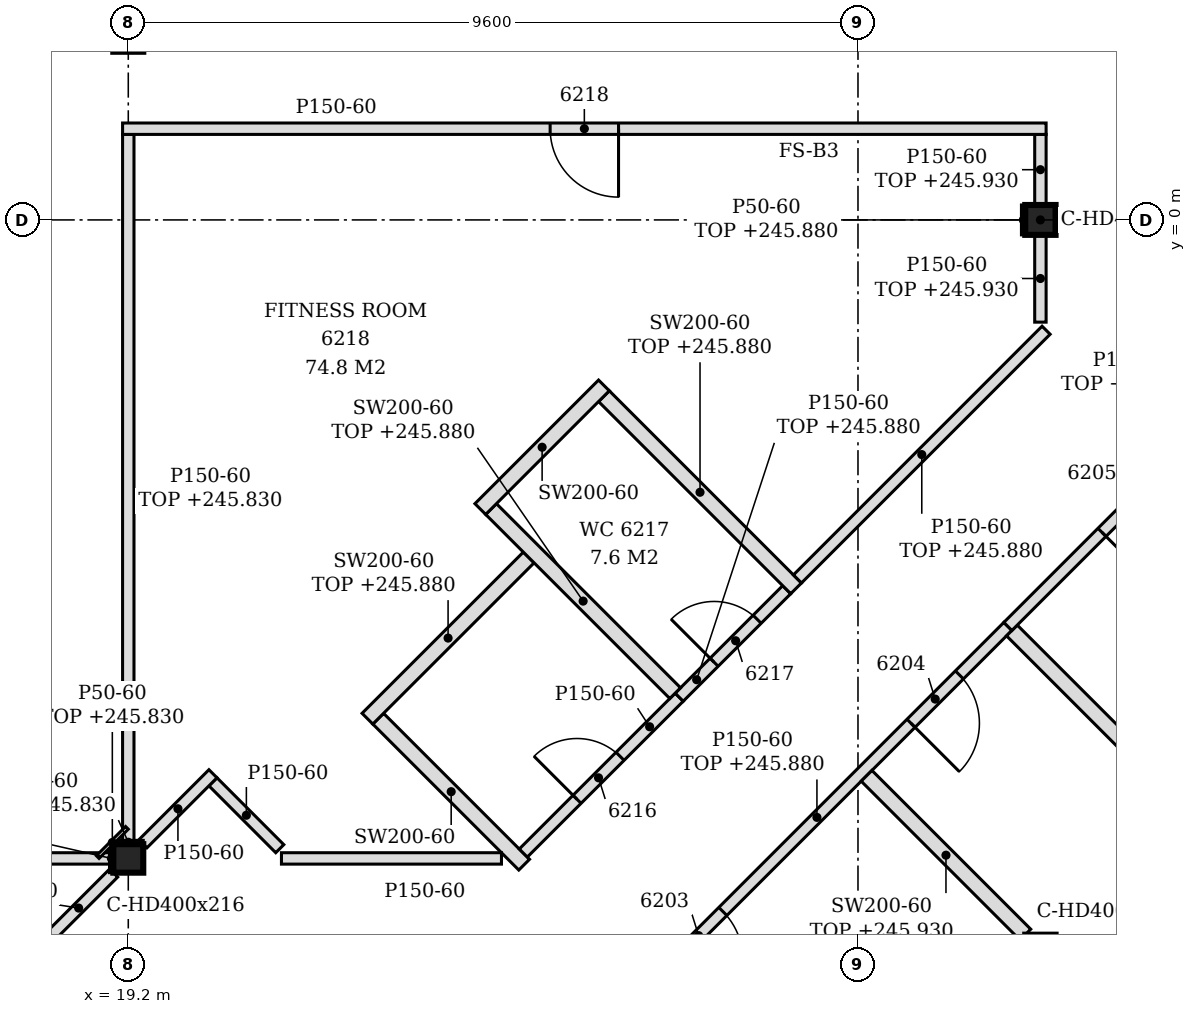
"""IFC4 building model, lengths in metres.
Left out: names, types, materials, properties, quantities, classifications, styles, units other than length and angle.
Written with IfcOpenShell. Run it as: python <this file> out.ifc"""

import sys

from ifc_helpers import new_model, si_unit, direction, frame, frame_2d, origin, origin_2d, place, context, subcontext, project, spatial, polyline, rectangle, i_section, outline, extrude, element, fill, save


model = new_model("IFC4")
c1 = context("Model", 3, precision=1e-05, world=origin(), true_north=direction((0.0, 1.0)))
c2 = subcontext(c1, "Body", "Model", "MODEL_VIEW")
j1 = project(units=[si_unit("LENGTHUNIT", "METRE"), si_unit("PLANEANGLEUNIT", "RADIAN")], contexts=[c1])
p1 = place(None, origin())
s1 = spatial("IfcSite", under=j1, at=p1, CompositionType="ELEMENT")
p2 = place(p1, origin())
s2 = spatial("IfcBuilding", under=s1, at=p2, CompositionType="ELEMENT")
p3 = place(p2, frame((0.0, 0.0, 243.0)))
s3 = spatial("IfcBuildingStorey", under=s2, at=p3, CompositionType="ELEMENT", Elevation=243.0)
p4 = place(p3, frame((19.2, -8.4, -0.15), z_axis=(0.0, 0.0, 1.0), x_axis=(1.0, 0.0, 0.0)))
e1 = element("IfcColumn", 1, at=p4, inside=s3, PredefinedType="COLUMN", context=c2, shape_type="SweptSolid", body=[
    extrude(i_section(OverallWidth=0.394, OverallDepth=0.375, WebThickness=0.017, FlangeThickness=0.028, FilletRadius=0.015, at=origin_2d()), origin(), (0.0, 0.0, 1.0), 3.6),
])
p5 = place(p3, frame((31.2, 0.0, -0.15), z_axis=(0.0, 0.0, 1.0), x_axis=(1.0, 0.0, 0.0)))
e2 = element("IfcColumn", 2, at=p5, inside=s3, PredefinedType="COLUMN", context=c2, shape_type="SweptSolid", body=[
    extrude(i_section(OverallWidth=0.399, OverallDepth=0.393, WebThickness=0.023, FlangeThickness=0.037, FilletRadius=0.015, at=origin_2d()), origin(), (0.0, 0.0, 1.0), 3.6),
])
p6 = place(p3, frame((24.619, -11.501, 0.0), z_axis=(0.0, 0.0, 1.0), x_axis=(0.707106781187, 0.707106781187, 0.0)))
e3 = element("IfcWall", 3, at=p6, inside=s3, PredefinedType="PARTITIONING", context=c2, shape_type="SweptSolid", body=[
    extrude(rectangle(XDim=8.702, YDim=0.15, at=frame_2d((4.351, 0.0))), origin(), (0.0, 0.0, 1.0), 2.88),
])
p7 = place(p6, frame((2.499, 0.0, 0.0)))
e4 = element("IfcOpeningElement", 4, at=p7, cuts=e3, PredefinedType="OPENING", context=c2, shape_type="SweptSolid", body=[
    extrude(rectangle(XDim=0.9, YDim=2.1, at=frame_2d((0.45, 1.05))), frame((0.0, 0.085, 0.0), z_axis=(0.0, -1.0, 0.0), x_axis=(1.0, 0.0, 0.0)), (0.0, 0.0, 1.0), 0.17),
])
p8 = place(p6, frame((6.9, 0.0, 0.0)))
e5 = element("IfcOpeningElement", 5, at=p8, cuts=e3, PredefinedType="OPENING", context=c2, shape_type="SweptSolid", body=[
    extrude(rectangle(XDim=0.9, YDim=2.1, at=frame_2d((0.45, 1.05))), frame((0.0, 0.085, 0.0), z_axis=(0.0, -1.0, 0.0), x_axis=(1.0, 0.0, 0.0)), (0.0, 0.0, 1.0), 0.17),
])
p9 = place(p3, frame((35.873, -10.449, 0.0), z_axis=(0.0, 0.0, 1.0), x_axis=(-0.707089680867, 0.707123881093, 0.0)))
e6 = element("IfcWall", 6, at=p9, inside=s3, PredefinedType="PARTITIONING", context=c2, shape_type="SweptSolid", body=[
    extrude(rectangle(XDim=7.139, YDim=0.2, at=frame_2d((3.569, 0.0))), origin(), (0.0, 0.0, 1.0), 2.93),
])
p10 = place(p3, frame((18.086, -9.514, 0.0), z_axis=(0.0, 0.0, 1.0), x_axis=(0.707200419109, 0.707013130862, 0.0)))
e7 = element("IfcWall", 7, at=p10, inside=s3, PredefinedType="PARTITIONING", context=c2, shape_type="SweptSolid", body=[
    extrude(rectangle(XDim=1.303, YDim=0.15, at=frame_2d((0.652, 0.0))), origin(), (0.0, 0.0, 1.0), 3.45),
])
p11 = place(p3, frame((31.002, -9.402, 0.0), z_axis=(0.0, 0.0, 1.0), x_axis=(-0.707065460118, 0.70714809984, 0.0)))
e8 = element("IfcWall", 8, at=p11, inside=s3, PredefinedType="PARTITIONING", context=c2, shape_type="SweptSolid", body=[
    extrude(rectangle(XDim=2.954, YDim=0.2, at=frame_2d((1.477, 0.0))), origin(), (0.0, 0.0, 1.0), 2.93),
])
p12 = place(p3, frame((24.408, -8.482, 0.0), z_axis=(0.0, 0.0, 1.0), x_axis=(-0.707061835578, 0.707151723938, 0.0)))
e9 = element("IfcWall", 9, at=p12, inside=s3, PredefinedType="PARTITIONING", context=c2, shape_type="SweptSolid", body=[
    extrude(rectangle(XDim=2.716, YDim=0.2, at=frame_2d((1.358, 0.0))), origin(), (0.0, 0.0, 1.0), 3.45),
])
p13 = place(p3, frame((7.397, -8.4, 0.0), z_axis=(0.0, 0.0, 1.0), x_axis=(1.0, 0.0, 0.0)))
e10 = element("IfcWall", 10, at=p13, inside=s3, PredefinedType="PARTITIONING", context=c2, shape_type="SweptSolid", body=[
    extrude(rectangle(XDim=11.606, YDim=0.15, at=frame_2d((5.803, 0.0))), origin(), (0.0, 0.0, 1.0), 2.83),
])
p14 = place(p3, frame((21.215, -8.4, 0.0), z_axis=(0.0, 0.0, 1.0), x_axis=(1.0, 0.0, 0.0)))
e11 = element("IfcWall", 11, at=p14, inside=s3, PredefinedType="PARTITIONING", context=c2, shape_type="SweptSolid", body=[
    extrude(rectangle(XDim=2.895, YDim=0.15, at=frame_2d((1.447, 0.0))), origin(), (0.0, 0.0, 1.0), 3.45),
])
p15 = place(p3, frame((21.193, -8.272, 0.0), z_axis=(0.0, 0.0, 1.0), x_axis=(-0.706812296552, 0.70740114323, 0.0)))
e12 = element("IfcWall", 12, at=p15, inside=s3, PredefinedType="PARTITIONING", context=c2, shape_type="SweptSolid", body=[
    extrude(rectangle(XDim=1.244, YDim=0.15, at=frame_2d((0.622, 0.0))), origin(), (0.0, 0.0, 1.0), 3.45),
])
p16 = place(p3, frame((24.397, -8.329, 0.0), z_axis=(0.0, 0.0, 1.0), x_axis=(0.707275119896, 0.706938402391, 0.0)))
e13 = element("IfcWall", 13, at=p16, inside=s3, PredefinedType="PARTITIONING", context=c2, shape_type="SweptSolid", body=[
    extrude(rectangle(XDim=2.9, YDim=0.15, at=frame_2d((1.45, 0.0))), origin(), (0.0, 0.0, 1.0), 3.45),
])
p17 = place(p16, frame((1.0, 0.0, 0.0)))
e14 = element("IfcOpeningElement", 14, at=p17, cuts=e13, PredefinedType="OPENING", context=c2, shape_type="SweptSolid", body=[
    extrude(rectangle(XDim=0.8, YDim=2.1, at=frame_2d((0.4, 1.05))), frame((0.0, 0.085, 0.0), z_axis=(0.0, -1.0, 0.0), x_axis=(1.0, 0.0, 0.0)), (0.0, 0.0, 1.0), 0.17),
])
p18 = place(p3, frame((19.2, -8.212, 0.0), z_axis=(0.0, 0.0, 1.0), x_axis=(0.0, 1.0, 0.0)))
e15 = element("IfcWall", 15, at=p18, inside=s3, PredefinedType="PARTITIONING", context=c2, shape_type="SweptSolid", body=[
    extrude(rectangle(XDim=9.337, YDim=0.15, at=frame_2d((4.669, 0.0))), origin(), (0.0, 0.0, 1.0), 2.83),
])
p19 = place(p3, frame((19.392, -8.208, 0.0), z_axis=(0.0, 0.0, 1.0), x_axis=(0.707106781187, 0.707106781187, 0.0)))
e16 = element("IfcWall", 16, at=p19, inside=s3, PredefinedType="PARTITIONING", context=c2, shape_type="SweptSolid", body=[
    extrude(rectangle(XDim=1.304, YDim=0.15, at=frame_2d((0.652, 0.0))), origin(), (0.0, 0.0, 1.0), 3.45),
])
p20 = place(p3, frame((22.346, -6.562, 0.0), z_axis=(0.0, 0.0, 1.0), x_axis=(0.707269502796, 0.706944022123, 0.0)))
e17 = element("IfcWall", 17, at=p20, inside=s3, PredefinedType="PARTITIONING", context=c2, shape_type="SweptSolid", body=[
    extrude(rectangle(XDim=3.0, YDim=0.2, at=frame_2d((1.5, 0.0))), origin(), (0.0, 0.0, 1.0), 2.88),
])
p21 = place(p3, frame((26.448, -6.279, 0.0), z_axis=(0.0, 0.0, 1.0), x_axis=(0.707106781187, 0.707106781187, 0.0)))
e18 = element("IfcWall", 18, at=p21, inside=s3, PredefinedType="PARTITIONING", context=c2, shape_type="SweptSolid", body=[
    extrude(rectangle(XDim=2.0, YDim=0.15, at=frame_2d((1.0, 0.0))), origin(), (0.0, 0.0, 1.0), 2.88),
])
p22 = place(p21, frame((0.65, 0.0, 0.0)))
e19 = element("IfcOpeningElement", 19, at=p22, cuts=e18, PredefinedType="OPENING", context=c2, shape_type="SweptSolid", body=[
    extrude(rectangle(XDim=0.8, YDim=2.1, at=frame_2d((0.4, 1.05))), frame((0.0, 0.085, 0.0), z_axis=(0.0, -1.0, 0.0), x_axis=(1.0, 0.0, 0.0)), (0.0, 0.0, 1.0), 0.17),
])
p23 = place(p3, frame((26.395, -6.226, 0.0), z_axis=(0.0, 0.0, 1.0), x_axis=(-0.707106781187, 0.707106781187, 0.0)))
e20 = element("IfcWall", 20, at=p23, inside=s3, PredefinedType="PARTITIONING", context=c2, shape_type="SweptSolid", body=[
    extrude(rectangle(XDim=3.426, YDim=0.2, at=frame_2d((1.713, 0.0))), origin(), (0.0, 0.0, 1.0), 2.88),
])
p24 = place(p3, frame((30.772, -5.348, 0.0), z_axis=(0.0, 0.0, 1.0), x_axis=(0.70724543229, 0.706968102891, 0.0)))
e21 = element("IfcWall", 21, at=p24, inside=s3, PredefinedType="PARTITIONING", context=c2, shape_type="SweptSolid", body=[
    extrude(rectangle(XDim=4.402, YDim=0.15, at=frame_2d((2.201, 0.0))), origin(), (0.0, 0.0, 1.0), 2.93),
])
p25 = place(p24, frame((1.751, 0.0, 0.0)))
e22 = element("IfcOpeningElement", 22, at=p25, cuts=e21, PredefinedType="OPENING", context=c2, shape_type="SweptSolid", body=[
    extrude(rectangle(XDim=0.9, YDim=2.1, at=frame_2d((0.45, 1.05))), frame((0.0, 0.085, 0.0), z_axis=(0.0, -1.0, 0.0), x_axis=(1.0, 0.0, 0.0)), (0.0, 0.0, 1.0), 0.17),
])
p26 = place(p3, frame((27.986, -4.847, 0.0), z_axis=(0.0, 0.0, 1.0), x_axis=(-0.707106781187, 0.707106781187, 0.0)))
e23 = element("IfcWall", 23, at=p26, inside=s3, PredefinedType="PARTITIONING", context=c2, shape_type="SweptSolid", body=[
    extrude(rectangle(XDim=3.576, YDim=0.2, at=frame_2d((1.788, 0.0))), origin(), (0.0, 0.0, 1.0), 2.88),
])
p27 = place(p3, frame((28.004, -4.723, 0.0), z_axis=(0.0, 0.0, 1.0), x_axis=(0.706974860744, 0.707238677022, 0.0)))
e24 = element("IfcWall", 24, at=p27, inside=s3, PredefinedType="PARTITIONING", context=c2, shape_type="SweptSolid", body=[
    extrude(rectangle(XDim=4.627, YDim=0.15, at=frame_2d((2.313, 0.0))), origin(), (0.0, 0.0, 1.0), 2.88),
])
p28 = place(p3, frame((23.831, -3.804, 0.0), z_axis=(0.0, 0.0, 1.0), x_axis=(0.707106781187, 0.707106781187, 0.0)))
e25 = element("IfcWall", 25, at=p28, inside=s3, PredefinedType="PARTITIONING", context=c2, shape_type="SweptSolid", body=[
    extrude(rectangle(XDim=2.3, YDim=0.2, at=frame_2d((1.15, 0.0))), origin(), (0.0, 0.0, 1.0), 3.45),
])
p29 = place(p3, frame((31.2, -1.345, 0.0), z_axis=(0.0, 0.0, 1.0), x_axis=(0.0, 1.0, 0.0)))
e26 = element("IfcWall", 26, at=p29, inside=s3, PredefinedType="PARTITIONING", context=c2, shape_type="SweptSolid", body=[
    extrude(rectangle(XDim=1.148, YDim=0.15, at=frame_2d((0.574, 0.0))), origin(), (0.0, 0.0, 1.0), 2.93),
])
p30 = place(p3, frame((31.2, 0.197, 0.0), z_axis=(0.0, 0.0, 1.0), x_axis=(0.0, 1.0, 0.0)))
e27 = element("IfcWall", 27, at=p30, inside=s3, PredefinedType="PARTITIONING", context=c2, shape_type="SweptSolid", body=[
    extrude(rectangle(XDim=0.928, YDim=0.15, at=frame_2d((0.464, 0.0))), origin(), (0.0, 0.0, 1.0), 2.93),
])
p31 = place(p3, frame((34.8, 0.994, 0.0), z_axis=(0.0, 0.0, 1.0), x_axis=(-0.707099634543, 0.707113927758, 0.0)))
e28 = element("IfcWall", 28, at=p31, inside=s3, PredefinedType="PARTITIONING", context=c2, shape_type="SweptSolid", body=[
    extrude(rectangle(XDim=17.081, YDim=0.15, at=frame_2d((8.541, 0.0))), origin(), (0.0, 0.0, 1.0), 2.88),
])
p32 = place(p31, frame((3.276, 0.0, 0.0)))
e29 = element("IfcOpeningElement", 29, at=p32, cuts=e28, PredefinedType="OPENING", context=c2, shape_type="SweptSolid", body=[
    extrude(rectangle(XDim=0.9, YDim=2.1, at=frame_2d((0.45, 1.05))), frame((0.0, 0.085, 0.0), z_axis=(0.0, -1.0, 0.0), x_axis=(1.0, 0.0, 0.0)), (0.0, 0.0, 1.0), 0.17),
])
p33 = place(p31, frame((6.829, 0.0, 0.0)))
e30 = element("IfcOpeningElement", 30, at=p33, cuts=e28, PredefinedType="OPENING", context=c2, shape_type="SweptSolid", body=[
    extrude(rectangle(XDim=0.9, YDim=2.1, at=frame_2d((0.45, 1.05))), frame((0.0, 0.085, 0.0), z_axis=(0.0, -1.0, 0.0), x_axis=(1.0, 0.0, 0.0)), (0.0, 0.0, 1.0), 0.17),
])
p34 = place(p31, frame((11.23, 0.0, 0.0)))
e31 = element("IfcOpeningElement", 31, at=p34, cuts=e28, PredefinedType="OPENING", context=c2, shape_type="SweptSolid", body=[
    extrude(rectangle(XDim=0.9, YDim=2.1, at=frame_2d((0.45, 1.05))), frame((0.0, 0.085, 0.0), z_axis=(0.0, -1.0, 0.0), x_axis=(1.0, 0.0, 0.0)), (0.0, 0.0, 1.0), 0.17),
])
p35 = place(p3, frame((19.125, 1.2, 0.0), z_axis=(0.0, 0.0, 1.0), x_axis=(1.0, 0.0, 0.0)))
e32 = element("IfcWall", 32, at=p35, inside=s3, PredefinedType="PARTITIONING", context=c2, shape_type="SweptSolid", body=[
    extrude(outline(polyline([(0.0, 0.0), (12.15, 0.0), (12.15, 2.93), (11.925, 2.93), (11.923, 3.45), (0.225, 3.45), (0.223, 2.83), (0.0, 2.83), (0.0, 0.0)])), frame((0.0, 0.075, 0.0), z_axis=(0.0, -1.0, 0.0), x_axis=(1.0, 0.0, 0.0)), (0.0, 0.0, 1.0), 0.15),
])
p36 = place(p35, frame((5.625, 0.0, 0.0)))
e33 = element("IfcOpeningElement", 33, at=p36, cuts=e32, PredefinedType="OPENING", context=c2, shape_type="SweptSolid", body=[
    extrude(rectangle(XDim=0.9, YDim=2.1, at=frame_2d((0.45, 1.05))), frame((0.0, 0.085, 0.0), z_axis=(0.0, -1.0, 0.0), x_axis=(1.0, 0.0, 0.0)), (0.0, 0.0, 1.0), 0.17),
])
p37 = place(p3, frame((18.798, -8.382, 0.0), z_axis=(0.0, 0.0, 1.0), x_axis=(0.707106781187, 0.707106781187, 0.0)))
e34 = element("IfcWall", 34, at=p37, inside=s3, PredefinedType="PARTITIONING", context=c2, shape_type="SweptSolid", body=[
    extrude(rectangle(XDim=0.544, YDim=0.05, at=frame_2d((0.272, 0.0))), origin(), (0.0, 0.0, 1.0), 2.83),
])
p38 = place(p3, frame((19.003, -8.188, 0.0), z_axis=(0.0, 0.0, 1.0), x_axis=(1.0, 0.0, 0.0)))
e35 = element("IfcWall", 35, at=p38, inside=s3, PredefinedType="PARTITIONING", context=c2, shape_type="SweptSolid", body=[
    extrude(rectangle(XDim=0.394, YDim=0.05, at=frame_2d((0.197, 0.0))), origin(), (0.0, 0.0, 1.0), 2.83),
])
p39 = place(p3, frame((18.978, -8.587, 0.0), z_axis=(0.0, 0.0, 1.0), x_axis=(0.0, 1.0, 0.0)))
e36 = element("IfcWall", 36, at=p39, inside=s3, PredefinedType="PARTITIONING", context=c2, shape_type="SweptSolid", body=[
    extrude(rectangle(XDim=0.375, YDim=0.05, at=frame_2d((0.188, 0.0))), origin(), (0.0, 0.0, 1.0), 2.83),
])
p40 = place(p3, frame((30.976, -0.197, 0.0), z_axis=(0.0, 0.0, 1.0), x_axis=(0.0, 1.0, 0.0)))
e37 = element("IfcWall", 37, at=p40, inside=s3, PredefinedType="PARTITIONING", context=c2, shape_type="SweptSolid", body=[
    extrude(rectangle(XDim=0.393, YDim=0.05, at=frame_2d((0.197, 0.0))), origin(), (0.0, 0.0, 1.0), 2.88),
])
p41 = place(p7, frame((0.9, 0.0, 0.0), z_axis=(0.0, 0.0, 1.0), x_axis=(-1.0, 0.0, 0.0)))
e38 = element("IfcDoor", 38, at=p41, inside=s3, OperationType="SINGLE_SWING_RIGHT", PredefinedType="DOOR", context=c2, shape_type="SweptSolid", body=[
    extrude(rectangle(XDim=0.9, YDim=2.1, at=frame_2d((0.45, 1.05))), frame((0.0, 0.025, 0.0), z_axis=(0.0, -1.0, 0.0), x_axis=(1.0, 0.0, 0.0)), (0.0, 0.0, 1.0), 0.05),
])
fill(e4, e38)
p42 = place(p8, frame((0.9, 0.0, 0.0), z_axis=(0.0, 0.0, 1.0), x_axis=(-1.0, 0.0, 0.0)))
e39 = element("IfcDoor", 39, at=p42, inside=s3, OperationType="SINGLE_SWING_RIGHT", PredefinedType="DOOR", context=c2, shape_type="SweptSolid", body=[
    extrude(rectangle(XDim=0.9, YDim=2.1, at=frame_2d((0.45, 1.05))), frame((0.0, 0.025, 0.0), z_axis=(0.0, -1.0, 0.0), x_axis=(1.0, 0.0, 0.0)), (0.0, 0.0, 1.0), 0.05),
])
fill(e5, e39)
p43 = place(p25, frame((0.9, 0.0, 0.0), z_axis=(0.0, 0.0, 1.0), x_axis=(-1.0, 0.0, 0.0)))
e40 = element("IfcDoor", 40, at=p43, inside=s3, OperationType="SINGLE_SWING_RIGHT", PredefinedType="DOOR", context=c2, shape_type="SweptSolid", body=[
    extrude(rectangle(XDim=0.9, YDim=2.1, at=frame_2d((0.45, 1.05))), frame((0.0, 0.025, 0.0), z_axis=(0.0, -1.0, 0.0), x_axis=(1.0, 0.0, 0.0)), (0.0, 0.0, 1.0), 0.05),
])
fill(e22, e40)
p44 = place(p17, origin())
e41 = element("IfcDoor", 41, at=p44, inside=s3, OperationType="SINGLE_SWING_LEFT", PredefinedType="DOOR", context=c2, shape_type="SweptSolid", body=[
    extrude(rectangle(XDim=0.8, YDim=2.1, at=frame_2d((0.4, 1.05))), frame((0.0, 0.025, 0.0), z_axis=(0.0, -1.0, 0.0), x_axis=(1.0, 0.0, 0.0)), (0.0, 0.0, 1.0), 0.05),
])
fill(e14, e41)
p45 = place(p22, origin())
e42 = element("IfcDoor", 42, at=p45, inside=s3, OperationType="SINGLE_SWING_LEFT", PredefinedType="DOOR", context=c2, shape_type="SweptSolid", body=[
    extrude(rectangle(XDim=0.8, YDim=2.1, at=frame_2d((0.4, 1.05))), frame((0.0, 0.025, 0.0), z_axis=(0.0, -1.0, 0.0), x_axis=(1.0, 0.0, 0.0)), (0.0, 0.0, 1.0), 0.05),
])
fill(e19, e42)
p46 = place(p36, frame((0.9, 0.0, 0.0), z_axis=(0.0, 0.0, 1.0), x_axis=(-1.0, 0.0, 0.0)))
e43 = element("IfcDoor", 43, at=p46, inside=s3, OperationType="SINGLE_SWING_LEFT", PredefinedType="DOOR", context=c2, shape_type="SweptSolid", body=[
    extrude(rectangle(XDim=0.9, YDim=2.1, at=frame_2d((0.45, 1.05))), frame((0.0, 0.025, 0.0), z_axis=(0.0, -1.0, 0.0), x_axis=(1.0, 0.0, 0.0)), (0.0, 0.0, 1.0), 0.05),
])
fill(e33, e43)
save(model, sys.argv[1])
